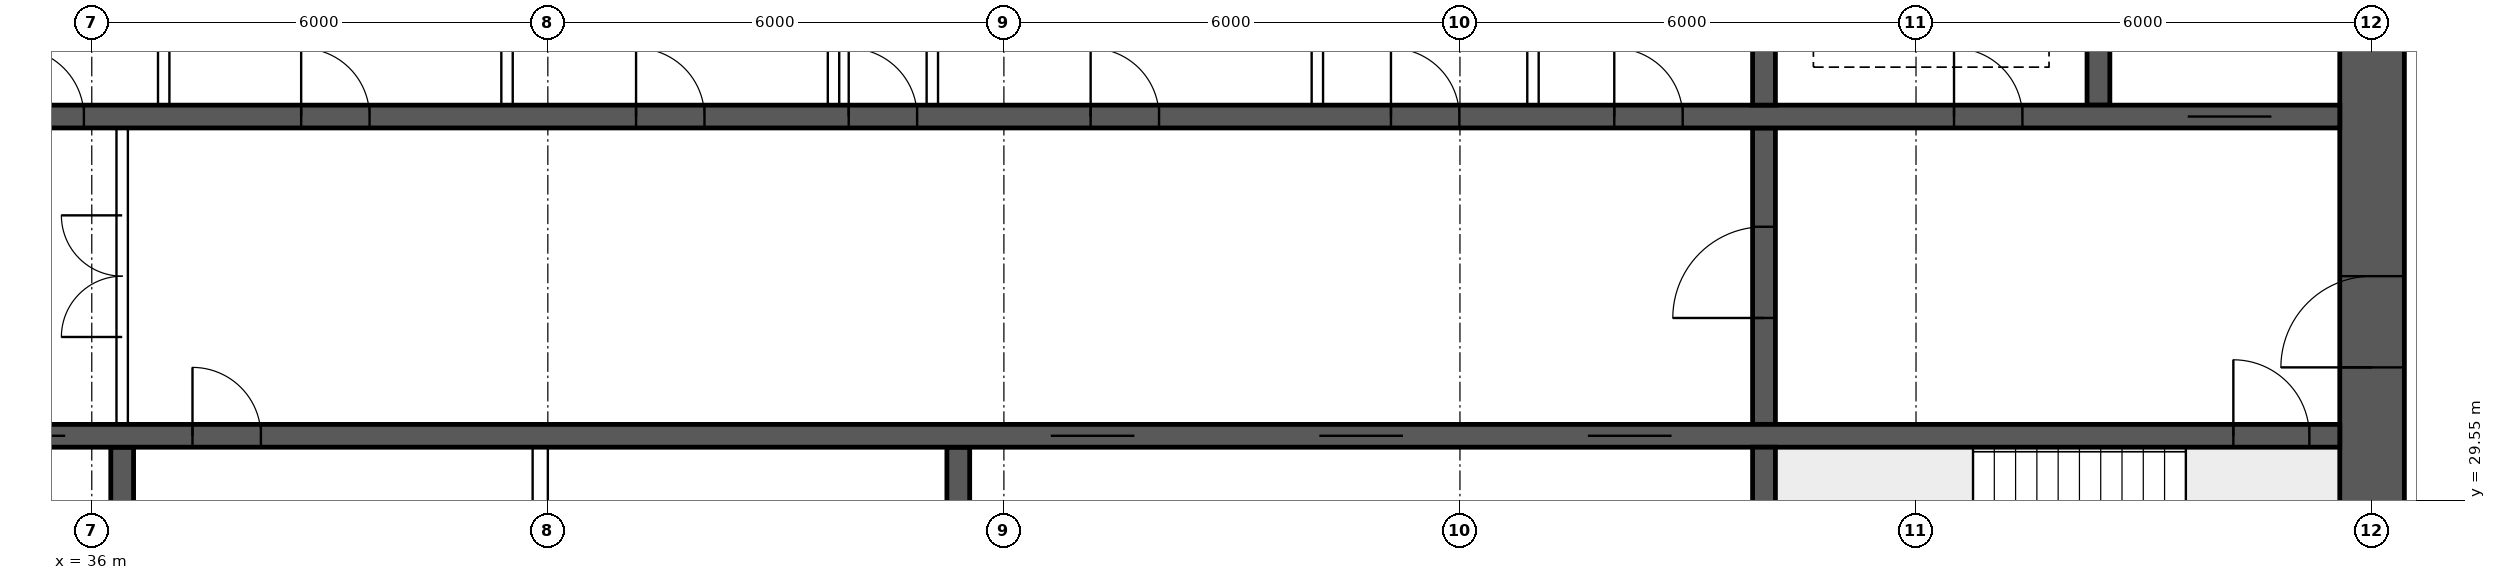
"""IFC4 building model, lengths in metres.
Left out: names, types, materials, properties, quantities, classifications, styles, units other than length and angle.
Written with IfcOpenShell. Run it as: python <this file> out.ifc"""

import sys

from ifc_helpers import new_model, si_unit, direction, frame, frame_2d, origin, place, context, subcontext, project, spatial, rectangle, extrude, element, fill, save


model = new_model("IFC4")
c1 = context("Model", 3, precision=1e-05, world=origin(), true_north=direction((0.0, 1.0)))
c2 = subcontext(c1, "Body", "Model", "MODEL_VIEW")
j1 = project(units=[si_unit("LENGTHUNIT", "METRE"), si_unit("PLANEANGLEUNIT", "RADIAN")], contexts=[c1])
p1 = place(None, origin())
s1 = spatial("IfcSite", under=j1, at=p1, CompositionType="ELEMENT")
p2 = place(p1, origin())
s2 = spatial("IfcBuilding", under=s1, at=p2, CompositionType="ELEMENT")
p3 = place(p2, frame((0.0, 0.0, 186.1)))
s3 = spatial("IfcBuildingStorey", under=s2, at=p3, CompositionType="ELEMENT", Elevation=186.1)
p4 = place(p3, frame((66.0, 26.225, 0.0), z_axis=(0.0, 0.0, 1.0), x_axis=(0.0, 1.0, 0.0)))
e1 = element("IfcWall", 1, at=p4, inside=s3, PredefinedType="SHEAR", context=c2, shape_type="SweptSolid", body=[
    extrude(rectangle(XDim=11.55, YDim=0.85, at=frame_2d((5.775, 0.0))), origin(), (0.0, 0.0, 1.0), 3.75),
])
p5 = place(p4, frame((5.075, 0.0, 0.0)))
e2 = element("IfcOpeningElement", 2, at=p5, cuts=e1, PredefinedType="OPENING", context=c2, shape_type="SweptSolid", body=[
    extrude(rectangle(XDim=1.2, YDim=2.1, at=frame_2d((0.6, 1.05))), frame((0.0, 0.435, 0.0), z_axis=(0.0, -1.0, 0.0), x_axis=(1.0, 0.0, 0.0)), (0.0, 0.0, 1.0), 0.87),
])
p6 = place(p3, frame((18.425, 30.4, 0.0), z_axis=(0.0, 0.0, 1.0), x_axis=(1.0, 0.0, 0.0)))
e3 = element("IfcWall", 3, at=p6, inside=s3, PredefinedType="SHEAR", context=c2, shape_type="SweptSolid", body=[
    extrude(rectangle(XDim=47.15, YDim=0.3, at=frame_2d((23.575, 0.0))), origin(), (0.0, 0.0, 1.0), 3.75),
])
p7 = place(p6, frame((0.4, 0.0, 0.0)))
e4 = element("IfcOpeningElement", 4, at=p7, cuts=e3, PredefinedType="OPENING", context=c2, shape_type="SweptSolid", body=[
    extrude(rectangle(XDim=1.0, YDim=2.1, at=frame_2d((0.5, 1.05))), frame((0.0, 0.16, 0.0), z_axis=(0.0, -1.0, 0.0), x_axis=(1.0, 0.0, 0.0)), (0.0, 0.0, 1.0), 0.32),
])
p8 = place(p6, frame((45.75, 0.0, 0.0)))
e5 = element("IfcOpeningElement", 5, at=p8, cuts=e3, PredefinedType="OPENING", context=c2, shape_type="SweptSolid", body=[
    extrude(rectangle(XDim=1.0, YDim=2.1, at=frame_2d((0.5, 1.05))), frame((0.0, 0.16, 0.0), z_axis=(0.0, -1.0, 0.0), x_axis=(1.0, 0.0, 0.0)), (0.0, 0.0, 1.0), 0.32),
])
p9 = place(p6, frame((8.325, 0.0, 0.0)))
e6 = element("IfcOpeningElement", 6, at=p9, cuts=e3, PredefinedType="OPENING", context=c2, shape_type="SweptSolid", body=[
    extrude(rectangle(XDim=1.1, YDim=2.1, at=frame_2d((0.55, 1.05))), frame((0.0, 0.16, 0.0), z_axis=(0.0, -1.0, 0.0), x_axis=(1.0, 0.0, 0.0)), (0.0, 0.0, 1.0), 0.32),
])
p10 = place(p6, frame((10.925, 0.0, 0.0)))
e7 = element("IfcOpeningElement", 7, at=p10, cuts=e3, PredefinedType="OPENING", context=c2, shape_type="SweptSolid", body=[
    extrude(rectangle(XDim=1.1, YDim=2.1, at=frame_2d((0.55, 1.05))), frame((0.0, 0.16, 0.0), z_axis=(0.0, -1.0, 0.0), x_axis=(1.0, 0.0, 0.0)), (0.0, 0.0, 1.0), 0.32),
])
p11 = place(p6, frame((13.525, 0.0, 0.0)))
e8 = element("IfcOpeningElement", 8, at=p11, cuts=e3, PredefinedType="OPENING", context=c2, shape_type="SweptSolid", body=[
    extrude(rectangle(XDim=1.1, YDim=2.1, at=frame_2d((0.55, 1.05))), frame((0.0, 0.16, 0.0), z_axis=(0.0, -1.0, 0.0), x_axis=(1.0, 0.0, 0.0)), (0.0, 0.0, 1.0), 0.32),
])
p12 = place(p6, frame((16.125, 0.0, 0.0)))
e9 = element("IfcOpeningElement", 9, at=p12, cuts=e3, PredefinedType="OPENING", context=c2, shape_type="SweptSolid", body=[
    extrude(rectangle(XDim=1.1, YDim=2.1, at=frame_2d((0.55, 1.05))), frame((0.0, 0.16, 0.0), z_axis=(0.0, -1.0, 0.0), x_axis=(1.0, 0.0, 0.0)), (0.0, 0.0, 1.0), 0.32),
])
p13 = place(p6, frame((18.9, 0.0, 0.0)))
e10 = element("IfcOpeningElement", 10, at=p13, cuts=e3, PredefinedType="OPENING", context=c2, shape_type="SweptSolid", body=[
    extrude(rectangle(XDim=0.9, YDim=2.1, at=frame_2d((0.45, 1.05))), frame((0.0, 0.16, 0.0), z_axis=(0.0, -1.0, 0.0), x_axis=(1.0, 0.0, 0.0)), (0.0, 0.0, 1.0), 0.32),
])
p14 = place(p6, frame((30.192, 0.0, 0.0)))
e11 = element("IfcOpeningElement", 11, at=p14, cuts=e3, PredefinedType="OPENING", context=c2, shape_type="SweptSolid", body=[
    extrude(rectangle(XDim=1.1, YDim=2.1, at=frame_2d((0.55, 1.05))), frame((0.0, 0.16, 0.0), z_axis=(0.0, -1.0, 0.0), x_axis=(1.0, 0.0, 0.0)), (0.0, 0.0, 1.0), 0.32),
])
p15 = place(p6, frame((33.725, 0.0, 0.0)))
e12 = element("IfcOpeningElement", 12, at=p15, cuts=e3, PredefinedType="OPENING", context=c2, shape_type="SweptSolid", body=[
    extrude(rectangle(XDim=1.1, YDim=2.1, at=frame_2d((0.55, 1.05))), frame((0.0, 0.16, 0.0), z_axis=(0.0, -1.0, 0.0), x_axis=(1.0, 0.0, 0.0)), (0.0, 0.0, 1.0), 0.32),
])
p16 = place(p6, frame((37.258, 0.0, 0.0)))
e13 = element("IfcOpeningElement", 13, at=p16, cuts=e3, PredefinedType="OPENING", context=c2, shape_type="SweptSolid", body=[
    extrude(rectangle(XDim=1.1, YDim=2.1, at=frame_2d((0.55, 1.05))), frame((0.0, 0.16, 0.0), z_axis=(0.0, -1.0, 0.0), x_axis=(1.0, 0.0, 0.0)), (0.0, 0.0, 1.0), 0.32),
])
p17 = place(p3, frame((18.425, 34.6, 0.0), z_axis=(0.0, 0.0, 1.0), x_axis=(1.0, 0.0, 0.0)))
e14 = element("IfcWall", 14, at=p17, inside=s3, PredefinedType="SHEAR", context=c2, shape_type="SweptSolid", body=[
    extrude(rectangle(XDim=47.15, YDim=0.3, at=frame_2d((23.575, 0.0))), origin(), (0.0, 0.0, 1.0), 3.75),
])
p18 = place(p17, frame((0.9, 0.0, 0.0)))
e15 = element("IfcOpeningElement", 15, at=p18, cuts=e14, PredefinedType="OPENING", context=c2, shape_type="SweptSolid", body=[
    extrude(rectangle(XDim=1.1, YDim=2.1, at=frame_2d((0.55, 1.05))), frame((0.0, 0.16, 0.0), z_axis=(0.0, -1.0, 0.0), x_axis=(1.0, 0.0, 0.0)), (0.0, 0.0, 1.0), 0.32),
])
p19 = place(p17, frame((45.15, 0.0, 0.0)))
e16 = element("IfcOpeningElement", 16, at=p19, cuts=e14, PredefinedType="OPENING", context=c2, shape_type="SweptSolid", body=[
    extrude(rectangle(XDim=1.1, YDim=2.1, at=frame_2d((0.55, 1.05))), frame((0.0, 0.16, 0.0), z_axis=(0.0, -1.0, 0.0), x_axis=(1.0, 0.0, 0.0)), (0.0, 0.0, 1.0), 0.32),
])
p20 = place(p17, frame((4.175, 0.0, 0.0)))
e17 = element("IfcOpeningElement", 17, at=p20, cuts=e14, PredefinedType="OPENING", context=c2, shape_type="SweptSolid", body=[
    extrude(rectangle(XDim=0.9, YDim=2.1, at=frame_2d((0.45, 1.05))), frame((0.0, 0.16, 0.0), z_axis=(0.0, -1.0, 0.0), x_axis=(1.0, 0.0, 0.0)), (0.0, 0.0, 1.0), 0.32),
])
p21 = place(p17, frame((42.075, 0.0, 0.0)))
e18 = element("IfcOpeningElement", 18, at=p21, cuts=e14, PredefinedType="OPENING", context=c2, shape_type="SweptSolid", body=[
    extrude(rectangle(XDim=0.9, YDim=2.1, at=frame_2d((0.45, 1.05))), frame((0.0, 0.16, 0.0), z_axis=(0.0, -1.0, 0.0), x_axis=(1.0, 0.0, 0.0)), (0.0, 0.0, 1.0), 0.32),
])
p22 = place(p17, frame((8.95, 0.0, 0.0)))
e19 = element("IfcOpeningElement", 19, at=p22, cuts=e14, PredefinedType="OPENING", context=c2, shape_type="SweptSolid", body=[
    extrude(rectangle(XDim=0.9, YDim=2.1, at=frame_2d((0.45, 1.05))), frame((0.0, 0.16, 0.0), z_axis=(0.0, -1.0, 0.0), x_axis=(1.0, 0.0, 0.0)), (0.0, 0.0, 1.0), 0.32),
])
p23 = place(p17, frame((12.924, 0.0, 0.0)))
e20 = element("IfcOpeningElement", 20, at=p23, cuts=e14, PredefinedType="OPENING", context=c2, shape_type="SweptSolid", body=[
    extrude(rectangle(XDim=0.9, YDim=2.1, at=frame_2d((0.45, 1.05))), frame((0.0, 0.16, 0.0), z_axis=(0.0, -1.0, 0.0), x_axis=(1.0, 0.0, 0.0)), (0.0, 0.0, 1.0), 0.32),
])
p24 = place(p17, frame((16.571, 0.0, 0.0)))
e21 = element("IfcOpeningElement", 21, at=p24, cuts=e14, PredefinedType="OPENING", context=c2, shape_type="SweptSolid", body=[
    extrude(rectangle(XDim=0.9, YDim=2.1, at=frame_2d((0.45, 1.05))), frame((0.0, 0.16, 0.0), z_axis=(0.0, -1.0, 0.0), x_axis=(1.0, 0.0, 0.0)), (0.0, 0.0, 1.0), 0.32),
])
p25 = place(p17, frame((20.33, 0.0, 0.0)))
e22 = element("IfcOpeningElement", 22, at=p25, cuts=e14, PredefinedType="OPENING", context=c2, shape_type="SweptSolid", body=[
    extrude(rectangle(XDim=0.9, YDim=2.1, at=frame_2d((0.45, 1.05))), frame((0.0, 0.16, 0.0), z_axis=(0.0, -1.0, 0.0), x_axis=(1.0, 0.0, 0.0)), (0.0, 0.0, 1.0), 0.32),
])
p26 = place(p17, frame((24.736, 0.0, 0.0)))
e23 = element("IfcOpeningElement", 23, at=p26, cuts=e14, PredefinedType="OPENING", context=c2, shape_type="SweptSolid", body=[
    extrude(rectangle(XDim=0.9, YDim=2.1, at=frame_2d((0.45, 1.05))), frame((0.0, 0.16, 0.0), z_axis=(0.0, -1.0, 0.0), x_axis=(1.0, 0.0, 0.0)), (0.0, 0.0, 1.0), 0.32),
])
p27 = place(p17, frame((27.533, 0.0, 0.0)))
e24 = element("IfcOpeningElement", 24, at=p27, cuts=e14, PredefinedType="OPENING", context=c2, shape_type="SweptSolid", body=[
    extrude(rectangle(XDim=0.9, YDim=2.1, at=frame_2d((0.45, 1.05))), frame((0.0, 0.16, 0.0), z_axis=(0.0, -1.0, 0.0), x_axis=(1.0, 0.0, 0.0)), (0.0, 0.0, 1.0), 0.32),
])
p28 = place(p17, frame((30.716, 0.0, 0.0)))
e25 = element("IfcOpeningElement", 25, at=p28, cuts=e14, PredefinedType="OPENING", context=c2, shape_type="SweptSolid", body=[
    extrude(rectangle(XDim=0.9, YDim=2.1, at=frame_2d((0.45, 1.05))), frame((0.0, 0.16, 0.0), z_axis=(0.0, -1.0, 0.0), x_axis=(1.0, 0.0, 0.0)), (0.0, 0.0, 1.0), 0.32),
])
p29 = place(p17, frame((34.667, 0.0, 0.0)))
e26 = element("IfcOpeningElement", 26, at=p29, cuts=e14, PredefinedType="OPENING", context=c2, shape_type="SweptSolid", body=[
    extrude(rectangle(XDim=0.9, YDim=2.1, at=frame_2d((0.45, 1.05))), frame((0.0, 0.16, 0.0), z_axis=(0.0, -1.0, 0.0), x_axis=(1.0, 0.0, 0.0)), (0.0, 0.0, 1.0), 0.32),
])
p30 = place(p17, frame((37.605, 0.0, 0.0)))
e27 = element("IfcOpeningElement", 27, at=p30, cuts=e14, PredefinedType="OPENING", context=c2, shape_type="SweptSolid", body=[
    extrude(rectangle(XDim=0.9, YDim=2.1, at=frame_2d((0.45, 1.05))), frame((0.0, 0.16, 0.0), z_axis=(0.0, -1.0, 0.0), x_axis=(1.0, 0.0, 0.0)), (0.0, 0.0, 1.0), 0.32),
])
p31 = place(p3, frame((58.0, 26.225, 0.0), z_axis=(0.0, 0.0, 1.0), x_axis=(0.0, 1.0, 0.0)))
e28 = element("IfcWall", 28, at=p31, inside=s3, PredefinedType="SHEAR", context=c2, shape_type="SweptSolid", body=[
    extrude(rectangle(XDim=4.025, YDim=0.3, at=frame_2d((2.012, 0.0))), origin(), (0.0, 0.0, 1.0), 3.75),
])
p32 = place(p3, frame((58.0, 30.55, 0.0), z_axis=(0.0, 0.0, 1.0), x_axis=(0.0, 1.0, 0.0)))
e29 = element("IfcWall", 29, at=p32, inside=s3, PredefinedType="SHEAR", context=c2, shape_type="SweptSolid", body=[
    extrude(rectangle(XDim=3.9, YDim=0.3, at=frame_2d((1.95, 0.0))), origin(), (0.0, 0.0, 1.0), 3.75),
])
p33 = place(p32, frame((1.4, 0.0, 0.0)))
e30 = element("IfcOpeningElement", 30, at=p33, cuts=e29, PredefinedType="OPENING", context=c2, shape_type="SweptSolid", body=[
    extrude(rectangle(XDim=1.2, YDim=2.1, at=frame_2d((0.6, 1.05))), frame((0.0, 0.16, 0.0), z_axis=(0.0, -1.0, 0.0), x_axis=(1.0, 0.0, 0.0)), (0.0, 0.0, 1.0), 0.32),
])
for number, where, z_axis, x_axis in (
    (31, (62.4, 34.75, 0.0), (0.0, 0.0, 1.0), (0.0, 1.0, 0.0)),
    (32, (58.0, 34.75, 0.0), (0.0, 0.0, 1.0), (0.0, 1.0, 0.0)),
):
    element("IfcWall", number, at=place(p3, frame(where, z_axis=z_axis, x_axis=x_axis)), inside=s3, PredefinedType="SHEAR", context=c2, shape_type="SweptSolid", body=[
        extrude(rectangle(XDim=3.025, YDim=0.3, at=frame_2d((1.512, 0.0))), origin(), (0.0, 0.0, 1.0), 3.75),
    ])
for number, where, z_axis, x_axis in (
    (33, (36.4, 26.225, 0.0), (0.0, 0.0, 1.0), (0.0, 1.0, 0.0)),
    (34, (47.4, 26.225, 0.0), (0.0, 0.0, 1.0), (0.0, 1.0, 0.0)),
):
    element("IfcWall", number, at=place(p3, frame(where, z_axis=z_axis, x_axis=x_axis)), inside=s3, PredefinedType="SHEAR", context=c2, shape_type="SweptSolid", body=[
        extrude(rectangle(XDim=4.025, YDim=0.3, at=frame_2d((2.012, 0.0))), origin(), (0.0, 0.0, 1.0), 3.75),
    ])
p34 = place(p3, frame((36.4, 30.55, 0.0), z_axis=(0.0, 0.0, 1.0), x_axis=(0.0, 1.0, 0.0)))
e35 = element("IfcWall", 35, at=p34, inside=s3, PredefinedType="SOLIDWALL", context=c2, shape_type="SweptSolid", body=[
    extrude(rectangle(XDim=3.9, YDim=0.15, at=frame_2d((1.95, 0.0))), origin(), (0.0, 0.0, 1.0), 3.5),
])
p35 = place(p34, frame((1.15, 0.0, 0.0)))
e36 = element("IfcOpeningElement", 36, at=p35, cuts=e35, PredefinedType="OPENING", context=c2, shape_type="SweptSolid", body=[
    extrude(rectangle(XDim=1.6, YDim=2.1, at=frame_2d((0.8, 1.05))), frame((0.0, 0.085, 0.0), z_axis=(0.0, -1.0, 0.0), x_axis=(1.0, 0.0, 0.0)), (0.0, 0.0, 1.0), 0.17),
])
for number, where, z_axis, x_axis in (
    (37, (36.946, 34.75, 0.0), (0.0, 0.0, 1.0), (0.0, 1.0, 0.0)),
    (38, (41.463, 34.75, 0.0), (0.0, 0.0, 1.0), (0.0, 1.0, 0.0)),
    (39, (45.758, 34.75, 0.0), (0.0, 0.0, 1.0), (0.0, 1.0, 0.0)),
    (40, (47.058, 34.75, 0.0), (0.0, 0.0, 1.0), (0.0, 1.0, 0.0)),
    (41, (52.124, 34.75, 0.0), (0.0, 0.0, 1.0), (0.0, 1.0, 0.0)),
    (42, (54.961, 34.75, 0.0), (0.0, 0.0, 1.0), (0.0, 1.0, 0.0)),
):
    element("IfcWall", number, at=place(p3, frame(where, z_axis=z_axis, x_axis=x_axis)), inside=s3, PredefinedType="SOLIDWALL", context=c2, shape_type="SweptSolid", body=[
        extrude(rectangle(XDim=3.025, YDim=0.15, at=frame_2d((1.512, 0.0))), origin(), (0.0, 0.0, 1.0), 3.5),
    ])
p36 = place(p3, frame((41.9, 26.225, 0.0), z_axis=(0.0, 0.0, 1.0), x_axis=(0.0, 1.0, 0.0)))
e43 = element("IfcWall", 43, at=p36, inside=s3, PredefinedType="SOLIDWALL", context=c2, shape_type="SweptSolid", body=[
    extrude(rectangle(XDim=4.025, YDim=0.2, at=frame_2d((2.012, 0.0))), origin(), (0.0, 0.0, 1.0), 3.5),
])
p37 = place(p35, origin())
e44 = element("IfcDoor", 44, at=p37, inside=s3, OperationType="DOUBLE_DOOR_SINGLE_SWING", PredefinedType="DOOR", context=c2, shape_type="SweptSolid", body=[
    extrude(rectangle(XDim=1.6, YDim=2.1, at=frame_2d((0.8, 1.05))), frame((0.0, 0.025, 0.0), z_axis=(0.0, -1.0, 0.0), x_axis=(1.0, 0.0, 0.0)), (0.0, 0.0, 1.0), 0.05),
])
fill(e36, e44)
p38 = place(p5, origin())
e45 = element("IfcDoor", 45, at=p38, inside=s3, OperationType="SINGLE_SWING_LEFT", PredefinedType="DOOR", context=c2, shape_type="SweptSolid", body=[
    extrude(rectangle(XDim=1.2, YDim=2.1, at=frame_2d((0.6, 1.05))), frame((0.0, 0.025, 0.0), z_axis=(0.0, -1.0, 0.0), x_axis=(1.0, 0.0, 0.0)), (0.0, 0.0, 1.0), 0.05),
])
fill(e2, e45)
p39 = place(p8, origin())
e46 = element("IfcDoor", 46, at=p39, inside=s3, OperationType="SINGLE_SWING_LEFT", PredefinedType="DOOR", context=c2, shape_type="SweptSolid", body=[
    extrude(rectangle(XDim=1.0, YDim=2.1, at=frame_2d((0.5, 1.05))), frame((0.0, 0.025, 0.0), z_axis=(0.0, -1.0, 0.0), x_axis=(1.0, 0.0, 0.0)), (0.0, 0.0, 1.0), 0.05),
])
fill(e5, e46)
p40 = place(p19, origin())
e47 = element("IfcDoor", 47, at=p40, inside=s3, OperationType="DOUBLE_DOOR_SLIDING", PredefinedType="DOOR", context=c2, shape_type="SweptSolid", body=[
    extrude(rectangle(XDim=1.1, YDim=2.1, at=frame_2d((0.55, 1.05))), frame((0.0, 0.025, 0.0), z_axis=(0.0, -1.0, 0.0), x_axis=(1.0, 0.0, 0.0)), (0.0, 0.0, 1.0), 0.05),
])
fill(e16, e47)
p41 = place(p21, origin())
e48 = element("IfcDoor", 48, at=p41, inside=s3, OperationType="SINGLE_SWING_LEFT", PredefinedType="DOOR", context=c2, shape_type="SweptSolid", body=[
    extrude(rectangle(XDim=0.9, YDim=2.1, at=frame_2d((0.45, 1.05))), frame((0.0, 0.025, 0.0), z_axis=(0.0, -1.0, 0.0), x_axis=(1.0, 0.0, 0.0)), (0.0, 0.0, 1.0), 0.05),
])
fill(e18, e48)
p42 = place(p33, origin())
e49 = element("IfcDoor", 49, at=p42, inside=s3, OperationType="SINGLE_SWING_LEFT", PredefinedType="DOOR", context=c2, shape_type="SweptSolid", body=[
    extrude(rectangle(XDim=1.2, YDim=2.1, at=frame_2d((0.6, 1.05))), frame((0.0, 0.025, 0.0), z_axis=(0.0, -1.0, 0.0), x_axis=(1.0, 0.0, 0.0)), (0.0, 0.0, 1.0), 0.05),
])
fill(e30, e49)
p43 = place(p24, origin())
e50 = element("IfcDoor", 50, at=p43, inside=s3, OperationType="SINGLE_SWING_LEFT", PredefinedType="DOOR", context=c2, shape_type="SweptSolid", body=[
    extrude(rectangle(XDim=0.9, YDim=2.1, at=frame_2d((0.45, 1.05))), frame((0.0, 0.025, 0.0), z_axis=(0.0, -1.0, 0.0), x_axis=(1.0, 0.0, 0.0)), (0.0, 0.0, 1.0), 0.05),
])
fill(e21, e50)
p44 = place(p25, origin())
e51 = element("IfcDoor", 51, at=p44, inside=s3, OperationType="SINGLE_SWING_LEFT", PredefinedType="DOOR", context=c2, shape_type="SweptSolid", body=[
    extrude(rectangle(XDim=0.9, YDim=2.1, at=frame_2d((0.45, 1.05))), frame((0.0, 0.025, 0.0), z_axis=(0.0, -1.0, 0.0), x_axis=(1.0, 0.0, 0.0)), (0.0, 0.0, 1.0), 0.05),
])
fill(e22, e51)
p45 = place(p26, origin())
e52 = element("IfcDoor", 52, at=p45, inside=s3, OperationType="SINGLE_SWING_LEFT", PredefinedType="DOOR", context=c2, shape_type="SweptSolid", body=[
    extrude(rectangle(XDim=0.9, YDim=2.1, at=frame_2d((0.45, 1.05))), frame((0.0, 0.025, 0.0), z_axis=(0.0, -1.0, 0.0), x_axis=(1.0, 0.0, 0.0)), (0.0, 0.0, 1.0), 0.05),
])
fill(e23, e52)
p46 = place(p27, origin())
e53 = element("IfcDoor", 53, at=p46, inside=s3, OperationType="SINGLE_SWING_LEFT", PredefinedType="DOOR", context=c2, shape_type="SweptSolid", body=[
    extrude(rectangle(XDim=0.9, YDim=2.1, at=frame_2d((0.45, 1.05))), frame((0.0, 0.025, 0.0), z_axis=(0.0, -1.0, 0.0), x_axis=(1.0, 0.0, 0.0)), (0.0, 0.0, 1.0), 0.05),
])
fill(e24, e53)
p47 = place(p28, origin())
e54 = element("IfcDoor", 54, at=p47, inside=s3, OperationType="SINGLE_SWING_LEFT", PredefinedType="DOOR", context=c2, shape_type="SweptSolid", body=[
    extrude(rectangle(XDim=0.9, YDim=2.1, at=frame_2d((0.45, 1.05))), frame((0.0, 0.025, 0.0), z_axis=(0.0, -1.0, 0.0), x_axis=(1.0, 0.0, 0.0)), (0.0, 0.0, 1.0), 0.05),
])
fill(e25, e54)
p48 = place(p29, origin())
e55 = element("IfcDoor", 55, at=p48, inside=s3, OperationType="SINGLE_SWING_LEFT", PredefinedType="DOOR", context=c2, shape_type="SweptSolid", body=[
    extrude(rectangle(XDim=0.9, YDim=2.1, at=frame_2d((0.45, 1.05))), frame((0.0, 0.025, 0.0), z_axis=(0.0, -1.0, 0.0), x_axis=(1.0, 0.0, 0.0)), (0.0, 0.0, 1.0), 0.05),
])
fill(e26, e55)
p49 = place(p30, origin())
e56 = element("IfcDoor", 56, at=p49, inside=s3, OperationType="SINGLE_SWING_LEFT", PredefinedType="DOOR", context=c2, shape_type="SweptSolid", body=[
    extrude(rectangle(XDim=0.9, YDim=2.1, at=frame_2d((0.45, 1.05))), frame((0.0, 0.025, 0.0), z_axis=(0.0, -1.0, 0.0), x_axis=(1.0, 0.0, 0.0)), (0.0, 0.0, 1.0), 0.05),
])
fill(e27, e56)
p50 = place(p12, origin())
e57 = element("IfcDoor", 57, at=p50, inside=s3, OperationType="DOUBLE_DOOR_SLIDING", PredefinedType="DOOR", context=c2, shape_type="SweptSolid", body=[
    extrude(rectangle(XDim=1.1, YDim=2.1, at=frame_2d((0.55, 1.05))), frame((0.0, 0.025, 0.0), z_axis=(0.0, -1.0, 0.0), x_axis=(1.0, 0.0, 0.0)), (0.0, 0.0, 1.0), 0.05),
])
fill(e9, e57)
p51 = place(p13, origin())
e58 = element("IfcDoor", 58, at=p51, inside=s3, OperationType="SINGLE_SWING_LEFT", PredefinedType="DOOR", context=c2, shape_type="SweptSolid", body=[
    extrude(rectangle(XDim=0.9, YDim=2.1, at=frame_2d((0.45, 1.05))), frame((0.0, 0.025, 0.0), z_axis=(0.0, -1.0, 0.0), x_axis=(1.0, 0.0, 0.0)), (0.0, 0.0, 1.0), 0.05),
])
fill(e10, e58)
p52 = place(p14, origin())
e59 = element("IfcDoor", 59, at=p52, inside=s3, OperationType="DOUBLE_DOOR_SLIDING", PredefinedType="DOOR", context=c2, shape_type="SweptSolid", body=[
    extrude(rectangle(XDim=1.1, YDim=2.1, at=frame_2d((0.55, 1.05))), frame((0.0, 0.025, 0.0), z_axis=(0.0, -1.0, 0.0), x_axis=(1.0, 0.0, 0.0)), (0.0, 0.0, 1.0), 0.05),
])
fill(e11, e59)
p53 = place(p15, origin())
e60 = element("IfcDoor", 60, at=p53, inside=s3, OperationType="DOUBLE_DOOR_SLIDING", PredefinedType="DOOR", context=c2, shape_type="SweptSolid", body=[
    extrude(rectangle(XDim=1.1, YDim=2.1, at=frame_2d((0.55, 1.05))), frame((0.0, 0.025, 0.0), z_axis=(0.0, -1.0, 0.0), x_axis=(1.0, 0.0, 0.0)), (0.0, 0.0, 1.0), 0.05),
])
fill(e12, e60)
p54 = place(p16, origin())
e61 = element("IfcDoor", 61, at=p54, inside=s3, OperationType="DOUBLE_DOOR_SLIDING", PredefinedType="DOOR", context=c2, shape_type="SweptSolid", body=[
    extrude(rectangle(XDim=1.1, YDim=2.1, at=frame_2d((0.55, 1.05))), frame((0.0, 0.025, 0.0), z_axis=(0.0, -1.0, 0.0), x_axis=(1.0, 0.0, 0.0)), (0.0, 0.0, 1.0), 0.05),
])
fill(e13, e61)
save(model, sys.argv[1])
